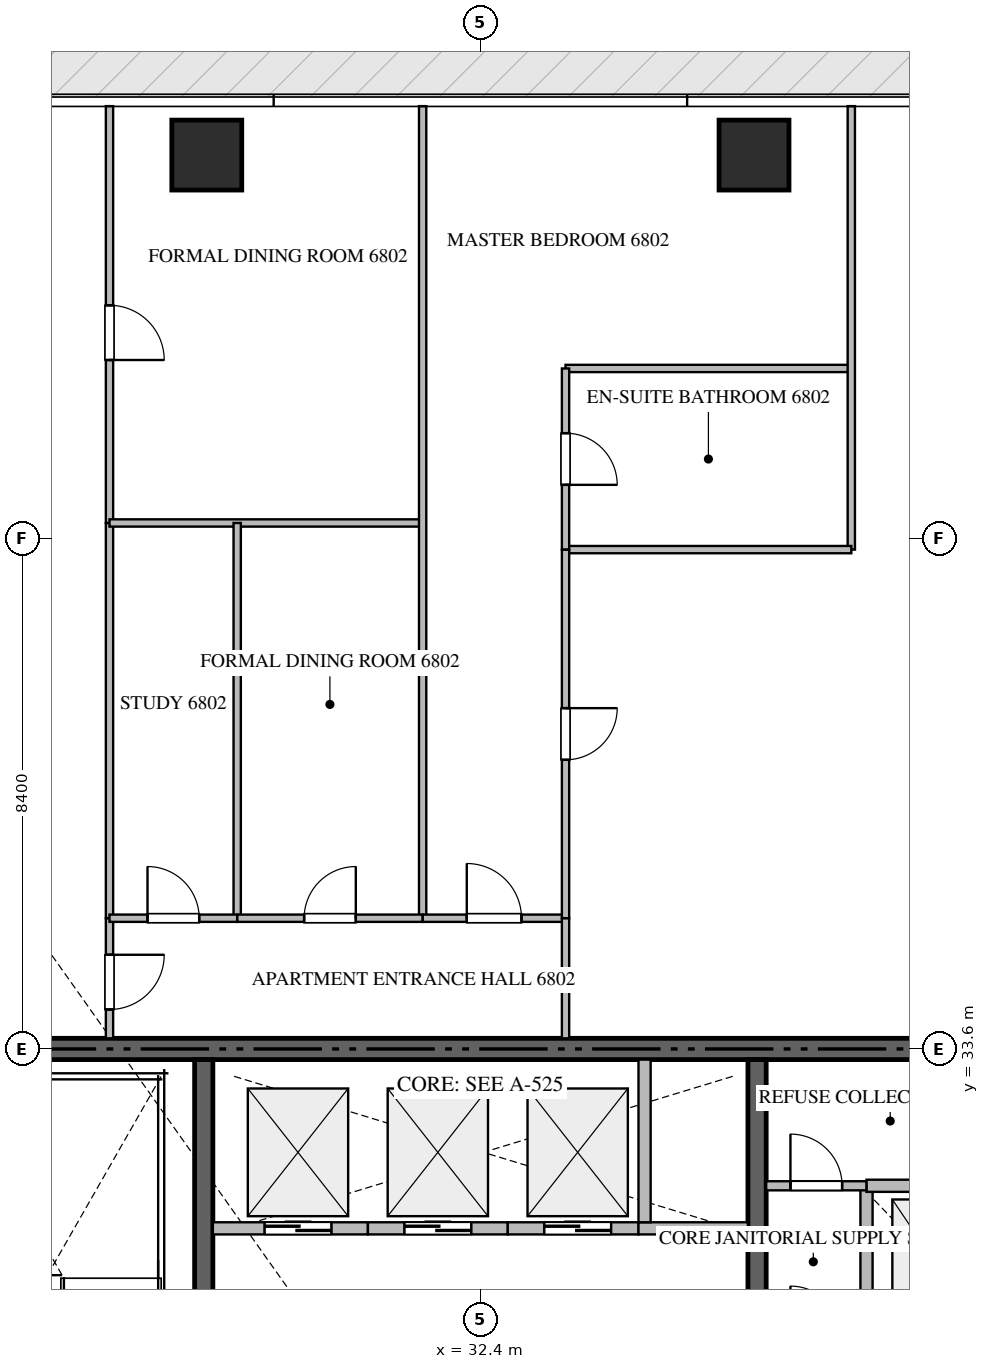
"""IFC4 building model, lengths in metres.
Left out: names, types, materials, properties, quantities, classifications, styles, units other than length and angle.
Written with IfcOpenShell. Run it as: python <this file> out.ifc"""

import sys

from ifc_helpers import new_model, si_unit, direction, frame, frame_2d, origin, origin_2d, place, context, subcontext, project, spatial, rectangle, extrude, source, transform, mapped, element, fill, save


model = new_model("IFC4")
c1 = context("Model", 3, precision=1e-05, world=origin(), true_north=direction((0.0, 1.0)))
c2 = subcontext(c1, "Body", "Model", "MODEL_VIEW")
j1 = project(units=[si_unit("LENGTHUNIT", "METRE"), si_unit("PLANEANGLEUNIT", "RADIAN")], contexts=[c1])
p1 = place(None, origin())
s1 = spatial("IfcSite", under=j1, at=p1, CompositionType="ELEMENT")
p2 = place(p1, origin())
s2 = spatial("IfcBuilding", under=s1, at=p2, CompositionType="ELEMENT")
p3 = place(p2, frame((0.0, 0.0, 272.05)))
s3 = spatial("IfcBuildingStorey", under=s2, at=p3, CompositionType="ELEMENT", Elevation=272.05)
p4 = place(p3, frame((41.4, 33.6, -0.26), z_axis=(0.0, 0.0, 1.0), x_axis=(-1.0, 0.0, 0.0)))
e1 = element("IfcWall", 1, at=p4, inside=s3, PredefinedType="SHEAR", context=c2, shape_type="SweptSolid", body=[
    extrude(rectangle(XDim=18.0, YDim=0.35, at=frame_2d((9.0, 0.0))), origin(), (0.0, 0.0, 1.0), 3.848),
])
p5 = place(p3, frame((27.85, 23.55, -0.26), z_axis=(0.0, 0.0, 1.0), x_axis=(0.0, 1.0, 0.0)))
e2 = element("IfcWall", 2, at=p5, inside=s3, PredefinedType="SHEAR", context=c2, shape_type="SweptSolid", body=[
    extrude(rectangle(XDim=9.875, YDim=0.3, at=frame_2d((4.938, 0.0))), origin(), (0.0, 0.0, 1.0), 3.848),
])
p6 = place(p3, frame((36.95, 27.05, -0.26), z_axis=(0.0, 0.0, 1.0), x_axis=(0.0, 1.0, 0.0)))
e3 = element("IfcWall", 3, at=p6, inside=s3, PredefinedType="SHEAR", context=c2, shape_type="SweptSolid", body=[
    extrude(rectangle(XDim=6.375, YDim=0.3, at=frame_2d((3.188, 0.0))), origin(), (0.0, 0.0, 1.0), 3.848),
])
m1 = source(origin(), c2, "Body", "SweptSolid", [
    extrude(rectangle(XDim=1.15, YDim=1.15, at=origin_2d()), origin(), (0.0, 0.0, 1.0), 3.85),
])
for number, where, z_axis, x_axis in (
    (4, (27.9, 48.3, -0.26), (0.0, 0.0, 1.0), (1.0, 0.0, 0.0)),
    (5, (36.9, 48.3, -0.26), (0.0, 0.0, 1.0), (1.0, 0.0, 0.0)),
):
    element("IfcColumn", number, at=place(p3, frame(where, z_axis=z_axis, x_axis=x_axis)), inside=s3, PredefinedType="COLUMN", context=c2, shape_type="MappedRepresentation", body=[
        mapped(m1, transform((0.0, 0.0, 0.0), scale=1.0)),
    ])
p7 = place(p3, frame((28.0, 30.65, 0.0), z_axis=(0.0, 0.0, 1.0), x_axis=(1.0, 0.0, 0.0)))
e6 = element("IfcWall", 6, at=p7, inside=s3, PredefinedType="STANDARD", context=c2, shape_type="SweptSolid", body=[
    extrude(rectangle(XDim=2.55, YDim=0.2, at=frame_2d((1.275, 0.0))), origin(), (0.0, 0.0, 1.0), 3.59),
])
p8 = place(p7, frame((0.85, 0.0, 0.0)))
e7 = element("IfcOpeningElement", 7, at=p8, cuts=e6, PredefinedType="OPENING", context=c2, shape_type="SweptSolid", body=[
    extrude(rectangle(XDim=1.1, YDim=2.2, at=frame_2d((0.55, 1.1))), frame((0.0, 0.11, 0.0), z_axis=(0.0, -1.0, 0.0), x_axis=(1.0, 0.0, 0.0)), (0.0, 0.0, 1.0), 0.22),
])
p9 = place(p3, frame((30.55, 30.65, 0.0), z_axis=(0.0, 0.0, 1.0), x_axis=(1.0, 0.0, 0.0)))
e8 = element("IfcWall", 8, at=p9, inside=s3, PredefinedType="STANDARD", context=c2, shape_type="SweptSolid", body=[
    extrude(rectangle(XDim=2.3, YDim=0.2, at=frame_2d((1.15, 0.0))), origin(), (0.0, 0.0, 1.0), 3.59),
])
p10 = place(p9, frame((0.6, 0.0, 0.0)))
e9 = element("IfcOpeningElement", 9, at=p10, cuts=e8, PredefinedType="OPENING", context=c2, shape_type="SweptSolid", body=[
    extrude(rectangle(XDim=1.1, YDim=2.2, at=frame_2d((0.55, 1.1))), frame((0.0, 0.11, 0.0), z_axis=(0.0, -1.0, 0.0), x_axis=(1.0, 0.0, 0.0)), (0.0, 0.0, 1.0), 0.22),
])
p11 = place(p3, frame((32.85, 30.65, 0.0), z_axis=(0.0, 0.0, 1.0), x_axis=(1.0, 0.0, 0.0)))
e10 = element("IfcWall", 10, at=p11, inside=s3, PredefinedType="STANDARD", context=c2, shape_type="SweptSolid", body=[
    extrude(rectangle(XDim=2.15, YDim=0.2, at=frame_2d((1.075, 0.0))), origin(), (0.0, 0.0, 1.0), 3.59),
])
p12 = place(p11, frame((0.6, 0.0, 0.0)))
e11 = element("IfcOpeningElement", 11, at=p12, cuts=e10, PredefinedType="OPENING", context=c2, shape_type="SweptSolid", body=[
    extrude(rectangle(XDim=1.1, YDim=2.2, at=frame_2d((0.55, 1.1))), frame((0.0, 0.11, 0.0), z_axis=(0.0, -1.0, 0.0), x_axis=(1.0, 0.0, 0.0)), (0.0, 0.0, 1.0), 0.22),
])
p13 = place(p3, frame((35.0, 30.65, 0.0), z_axis=(0.0, 0.0, 1.0), x_axis=(1.0, 0.0, 0.0)))
e12 = element("IfcWall", 12, at=p13, inside=s3, PredefinedType="STANDARD", context=c2, shape_type="SweptSolid", body=[
    extrude(rectangle(XDim=1.8, YDim=0.2, at=frame_2d((0.9, 0.0))), origin(), (0.0, 0.0, 1.0), 3.59),
])
p14 = place(p3, frame((35.1, 30.75, 0.0), z_axis=(0.0, 0.0, 1.0), x_axis=(0.0, 1.0, 0.0)))
e13 = element("IfcWall", 13, at=p14, inside=s3, PredefinedType="STANDARD", context=c2, shape_type="SweptSolid", body=[
    extrude(rectangle(XDim=2.675, YDim=0.2, at=frame_2d((1.337, 0.0))), origin(), (0.0, 0.0, 1.0), 3.59),
])
p15 = place(p3, frame((38.75, 28.85, 0.0), z_axis=(0.0, 0.0, 1.0), x_axis=(0.0, 1.0, 0.0)))
e14 = element("IfcWall", 14, at=p15, inside=s3, PredefinedType="STANDARD", context=c2, shape_type="SweptSolid", body=[
    extrude(rectangle(XDim=2.5, YDim=0.2, at=frame_2d((1.25, 0.0))), origin(), (0.0, 0.0, 1.0), 3.59),
])
p16 = place(p3, frame((38.75, 31.35, 0.0), z_axis=(0.0, 0.0, 1.0), x_axis=(1.0, 0.0, 0.0)))
e15 = element("IfcWall", 15, at=p16, inside=s3, PredefinedType="STANDARD", context=c2, shape_type="SweptSolid", body=[
    extrude(rectangle(XDim=2.475, YDim=0.2, at=frame_2d((1.238, 0.0))), origin(), (0.0, 0.0, 1.0), 3.59),
])
p17 = place(p3, frame((37.1, 31.35, 0.0), z_axis=(0.0, 0.0, 1.0), x_axis=(1.0, 0.0, 0.0)))
e16 = element("IfcWall", 16, at=p17, inside=s3, PredefinedType="PARTITIONING", context=c2, shape_type="SweptSolid", body=[
    extrude(rectangle(XDim=1.648, YDim=0.15, at=frame_2d((0.824, 0.0))), origin(), (0.0, 0.0, 1.0), 3.59),
])
p18 = place(p17, frame((0.399, 0.0, 0.0)))
e17 = element("IfcOpeningElement", 17, at=p18, cuts=e16, PredefinedType="OPENING", context=c2, shape_type="SweptSolid", body=[
    extrude(rectangle(XDim=0.85, YDim=2.1, at=frame_2d((0.425, 1.05))), frame((0.0, 0.085, 0.0), z_axis=(0.0, -1.0, 0.0), x_axis=(1.0, 0.0, 0.0)), (0.0, 0.0, 1.0), 0.17),
])
p19 = place(p3, frame((26.3, 35.75, 0.0), z_axis=(0.0, 0.0, 1.0), x_axis=(0.0, -1.0, 0.0)))
e18 = element("IfcWall", 18, at=p19, inside=s3, PredefinedType="PARTITIONING", context=c2, shape_type="SweptSolid", body=[
    extrude(rectangle(XDim=1.975, YDim=0.12, at=frame_2d((0.988, 0.0))), origin(), (0.0, 0.0, 1.0), 3.59),
])
p20 = place(p19, frame((0.601, 0.0, 0.0)))
e19 = element("IfcOpeningElement", 19, at=p20, cuts=e18, PredefinedType="OPENING", context=c2, shape_type="SweptSolid", body=[
    extrude(rectangle(XDim=0.9, YDim=2.1, at=frame_2d((0.45, 1.05))), frame((0.0, 0.07, 0.0), z_axis=(0.0, -1.0, 0.0), x_axis=(1.0, 0.0, 0.0)), (0.0, 0.0, 1.0), 0.14),
])
p21 = place(p3, frame((26.3, 49.105, 0.0), z_axis=(0.0, 0.0, 1.0), x_axis=(0.0, -1.0, 0.0)))
e20 = element("IfcWall", 20, at=p21, inside=s3, PredefinedType="PARTITIONING", context=c2, shape_type="SweptSolid", body=[
    extrude(rectangle(XDim=6.855, YDim=0.12, at=frame_2d((3.427, 0.0))), origin(), (0.0, 0.0, 1.0), 3.59),
])
p22 = place(p21, frame((3.275, 0.0, 0.0)))
e21 = element("IfcOpeningElement", 21, at=p22, cuts=e20, PredefinedType="OPENING", context=c2, shape_type="SweptSolid", body=[
    extrude(rectangle(XDim=0.9, YDim=2.1, at=frame_2d((0.45, 1.05))), frame((0.0, 0.07, 0.0), z_axis=(0.0, -1.0, 0.0), x_axis=(1.0, 0.0, 0.0)), (0.0, 0.0, 1.0), 0.14),
])
p23 = place(p3, frame((26.3, 42.248, 0.0), z_axis=(0.0, 0.0, 1.0), x_axis=(0.0, -1.0, 0.0)))
e22 = element("IfcWall", 22, at=p23, inside=s3, PredefinedType="PARTITIONING", context=c2, shape_type="SweptSolid", body=[
    extrude(rectangle(XDim=6.496, YDim=0.12, at=frame_2d((3.248, 0.0))), origin(), (0.0, 0.0, 1.0), 3.59),
])
p24 = place(p3, frame((26.3, 42.25, 0.0), z_axis=(0.0, 0.0, 1.0), x_axis=(1.0, 0.0, 0.0)))
e23 = element("IfcWall", 23, at=p24, inside=s3, PredefinedType="PARTITIONING", context=c2, shape_type="SweptSolid", body=[
    extrude(rectangle(XDim=5.15, YDim=0.12, at=frame_2d((2.575, 0.0))), origin(), (0.0, 0.0, 1.0), 3.59),
])
p25 = place(p3, frame((31.45, 49.105, 0.0), z_axis=(0.0, 0.0, 1.0), x_axis=(0.0, -1.0, 0.0)))
e24 = element("IfcWall", 24, at=p25, inside=s3, PredefinedType="PARTITIONING", context=c2, shape_type="SweptSolid", body=[
    extrude(rectangle(XDim=13.355, YDim=0.12, at=frame_2d((6.677, 0.0))), origin(), (0.0, 0.0, 1.0), 3.59),
])
p26 = place(p3, frame((28.4, 42.25, 0.0), z_axis=(0.0, 0.0, 1.0), x_axis=(0.0, -1.0, 0.0)))
e25 = element("IfcWall", 25, at=p26, inside=s3, PredefinedType="PARTITIONING", context=c2, shape_type="SweptSolid", body=[
    extrude(rectangle(XDim=6.5, YDim=0.12, at=frame_2d((3.25, 0.0))), origin(), (0.0, 0.0, 1.0), 3.59),
])
p27 = place(p3, frame((26.3, 35.75, 0.0), z_axis=(0.0, 0.0, 1.0), x_axis=(1.0, 0.0, 0.0)))
e26 = element("IfcWall", 26, at=p27, inside=s3, PredefinedType="PARTITIONING", context=c2, shape_type="SweptSolid", body=[
    extrude(rectangle(XDim=2.1, YDim=0.12, at=frame_2d((1.05, 0.0))), origin(), (0.0, 0.0, 1.0), 3.59),
])
p28 = place(p27, frame((0.625, 0.0, 0.0)))
e27 = element("IfcOpeningElement", 27, at=p28, cuts=e26, PredefinedType="OPENING", context=c2, shape_type="SweptSolid", body=[
    extrude(rectangle(XDim=0.85, YDim=2.1, at=frame_2d((0.425, 1.05))), frame((0.0, 0.07, 0.0), z_axis=(0.0, -1.0, 0.0), x_axis=(1.0, 0.0, 0.0)), (0.0, 0.0, 1.0), 0.14),
])
p29 = place(p3, frame((28.402, 35.75, 0.0), z_axis=(0.0, 0.0, 1.0), x_axis=(1.0, 0.0, 0.0)))
e28 = element("IfcWall", 28, at=p29, inside=s3, PredefinedType="PARTITIONING", context=c2, shape_type="SweptSolid", body=[
    extrude(rectangle(XDim=3.048, YDim=0.12, at=frame_2d((1.524, 0.0))), origin(), (0.0, 0.0, 1.0), 3.59),
])
p30 = place(p29, frame((1.099, 0.0, 0.0)))
e29 = element("IfcOpeningElement", 29, at=p30, cuts=e28, PredefinedType="OPENING", context=c2, shape_type="SweptSolid", body=[
    extrude(rectangle(XDim=0.85, YDim=2.1, at=frame_2d((0.425, 1.05))), frame((0.0, 0.07, 0.0), z_axis=(0.0, -1.0, 0.0), x_axis=(1.0, 0.0, 0.0)), (0.0, 0.0, 1.0), 0.14),
])
p31 = place(p3, frame((31.452, 35.75, 0.0), z_axis=(0.0, 0.0, 1.0), x_axis=(1.0, 0.0, 0.0)))
e30 = element("IfcWall", 30, at=p31, inside=s3, PredefinedType="PARTITIONING", context=c2, shape_type="SweptSolid", body=[
    extrude(rectangle(XDim=2.348, YDim=0.12, at=frame_2d((1.174, 0.0))), origin(), (0.0, 0.0, 1.0), 3.59),
])
p32 = place(p31, frame((0.724, 0.0, 0.0)))
e31 = element("IfcOpeningElement", 31, at=p32, cuts=e30, PredefinedType="OPENING", context=c2, shape_type="SweptSolid", body=[
    extrude(rectangle(XDim=0.9, YDim=2.1, at=frame_2d((0.45, 1.05))), frame((0.0, 0.07, 0.0), z_axis=(0.0, -1.0, 0.0), x_axis=(1.0, 0.0, 0.0)), (0.0, 0.0, 1.0), 0.14),
])
p33 = place(p3, frame((33.8, 44.791, 0.0), z_axis=(0.0, 0.0, 1.0), x_axis=(1.0, 0.0, 0.0)))
e32 = element("IfcWall", 32, at=p33, inside=s3, PredefinedType="PARTITIONING", context=c2, shape_type="SweptSolid", body=[
    extrude(rectangle(XDim=4.7, YDim=0.12, at=frame_2d((2.35, 0.0))), origin(), (0.0, 0.0, 1.0), 3.59),
])
p34 = place(p3, frame((38.5, 49.105, 0.0), z_axis=(0.0, 0.0, 1.0), x_axis=(0.0, -1.0, 0.0)))
e33 = element("IfcWall", 33, at=p34, inside=s3, PredefinedType="PARTITIONING", context=c2, shape_type="SweptSolid", body=[
    extrude(rectangle(XDim=7.293, YDim=0.12, at=frame_2d((3.646, 0.0))), origin(), (0.0, 0.0, 1.0), 3.59),
])
p35 = place(p3, frame((33.8, 41.812, 0.0), z_axis=(0.0, 0.0, 1.0), x_axis=(1.0, 0.0, 0.0)))
e34 = element("IfcWall", 34, at=p35, inside=s3, PredefinedType="PARTITIONING", context=c2, shape_type="SweptSolid", body=[
    extrude(rectangle(XDim=4.7, YDim=0.12, at=frame_2d((2.35, 0.0))), origin(), (0.0, 0.0, 1.0), 3.59),
])
p36 = place(p3, frame((33.8, 44.791, 0.0), z_axis=(0.0, 0.0, 1.0), x_axis=(0.0, -1.0, 0.0)))
e35 = element("IfcWall", 35, at=p36, inside=s3, PredefinedType="PARTITIONING", context=c2, shape_type="SweptSolid", body=[
    extrude(rectangle(XDim=2.979, YDim=0.12, at=frame_2d((1.49, 0.0))), origin(), (0.0, 0.0, 1.0), 3.59),
])
p37 = place(p36, frame((1.064, 0.0, 0.0)))
e36 = element("IfcOpeningElement", 36, at=p37, cuts=e35, PredefinedType="OPENING", context=c2, shape_type="SweptSolid", body=[
    extrude(rectangle(XDim=0.85, YDim=2.1, at=frame_2d((0.425, 1.05))), frame((0.0, 0.07, 0.0), z_axis=(0.0, -1.0, 0.0), x_axis=(1.0, 0.0, 0.0)), (0.0, 0.0, 1.0), 0.14),
])
p38 = place(p3, frame((33.8, 41.81, 0.0), z_axis=(0.0, 0.0, 1.0), x_axis=(0.0, -1.0, 0.0)))
e37 = element("IfcWall", 37, at=p38, inside=s3, PredefinedType="PARTITIONING", context=c2, shape_type="SweptSolid", body=[
    extrude(rectangle(XDim=6.06, YDim=0.12, at=frame_2d((3.03, 0.0))), origin(), (0.0, 0.0, 1.0), 3.59),
])
p39 = place(p38, frame((2.605, 0.0, 0.0)))
e38 = element("IfcOpeningElement", 38, at=p39, cuts=e37, PredefinedType="OPENING", context=c2, shape_type="SweptSolid", body=[
    extrude(rectangle(XDim=0.85, YDim=2.1, at=frame_2d((0.425, 1.05))), frame((0.0, 0.07, 0.0), z_axis=(0.0, -1.0, 0.0), x_axis=(1.0, 0.0, 0.0)), (0.0, 0.0, 1.0), 0.14),
])
p40 = place(p3, frame((33.8, 35.748, 0.0), z_axis=(0.0, 0.0, 1.0), x_axis=(0.0, -1.0, 0.0)))
e39 = element("IfcWall", 39, at=p40, inside=s3, PredefinedType="PARTITIONING", context=c2, shape_type="SweptSolid", body=[
    extrude(rectangle(XDim=1.973, YDim=0.12, at=frame_2d((0.987, 0.0))), origin(), (0.0, 0.0, 1.0), 3.59),
])
m2 = source(origin(), c2, "Body", "SweptSolid", [
    extrude(rectangle(XDim=1.1, YDim=2.2, at=frame_2d((0.55, 1.1))), frame((0.0, 0.025, 0.0), z_axis=(0.0, -1.0, 0.0), x_axis=(1.0, 0.0, 0.0)), (0.0, 0.0, 1.0), 0.05),
])
p41 = place(p8, origin())
e40 = element("IfcDoor", 40, at=p41, inside=s3, OperationType="DOUBLE_DOOR_SLIDING", PredefinedType="DOOR", context=c2, shape_type="MappedRepresentation", body=[
    mapped(m2, transform((0.0, 0.0, 0.0), scale=1.0)),
])
fill(e7, e40)
p42 = place(p10, origin())
e41 = element("IfcDoor", 41, at=p42, inside=s3, OperationType="DOUBLE_DOOR_SLIDING", PredefinedType="DOOR", context=c2, shape_type="MappedRepresentation", body=[
    mapped(m2, transform((0.0, 0.0, 0.0), scale=1.0)),
])
fill(e9, e41)
p43 = place(p12, origin())
e42 = element("IfcDoor", 42, at=p43, inside=s3, OperationType="DOUBLE_DOOR_SLIDING", PredefinedType="DOOR", context=c2, shape_type="MappedRepresentation", body=[
    mapped(m2, transform((0.0, 0.0, 0.0), scale=1.0)),
])
fill(e11, e42)
m3 = source(origin(), c2, "Body", "SweptSolid", [
    extrude(rectangle(XDim=0.85, YDim=2.1, at=frame_2d((0.425, 1.05))), frame((0.0, 0.025, 0.0), z_axis=(0.0, -1.0, 0.0), x_axis=(1.0, 0.0, 0.0)), (0.0, 0.0, 1.0), 0.05),
])
p44 = place(p18, origin())
e43 = element("IfcDoor", 43, at=p44, inside=s3, OperationType="SINGLE_SWING_LEFT", PredefinedType="DOOR", context=c2, shape_type="MappedRepresentation", body=[
    mapped(m3, transform((0.0, 0.0, 0.0), scale=1.0)),
])
fill(e17, e43)
m4 = source(origin(), c2, "Body", "SweptSolid", [
    extrude(rectangle(XDim=0.9, YDim=2.1, at=frame_2d((0.45, 1.05))), frame((0.0, 0.025, 0.0), z_axis=(0.0, -1.0, 0.0), x_axis=(1.0, 0.0, 0.0)), (0.0, 0.0, 1.0), 0.05),
])
p45 = place(p20, origin())
e44 = element("IfcDoor", 44, at=p45, inside=s3, OperationType="SINGLE_SWING_LEFT", PredefinedType="DOOR", context=c2, shape_type="MappedRepresentation", body=[
    mapped(m4, transform((0.0, 0.0, 0.0), scale=1.0)),
])
fill(e19, e44)
p46 = place(p22, origin())
e45 = element("IfcDoor", 45, at=p46, inside=s3, OperationType="SINGLE_SWING_RIGHT", PredefinedType="DOOR", context=c2, shape_type="MappedRepresentation", body=[
    mapped(m4, transform((0.0, 0.0, 0.0), scale=1.0)),
])
fill(e21, e45)
p47 = place(p28, origin())
e46 = element("IfcDoor", 46, at=p47, inside=s3, OperationType="SINGLE_SWING_LEFT", PredefinedType="DOOR", context=c2, shape_type="MappedRepresentation", body=[
    mapped(m3, transform((0.0, 0.0, 0.0), scale=1.0)),
])
fill(e27, e46)
p48 = place(p30, origin())
e47 = element("IfcDoor", 47, at=p48, inside=s3, OperationType="SINGLE_SWING_RIGHT", PredefinedType="DOOR", context=c2, shape_type="MappedRepresentation", body=[
    mapped(m3, transform((0.0, 0.0, 0.0), scale=1.0)),
])
fill(e29, e47)
p49 = place(p32, origin())
e48 = element("IfcDoor", 48, at=p49, inside=s3, OperationType="SINGLE_SWING_LEFT", PredefinedType="DOOR", context=c2, shape_type="MappedRepresentation", body=[
    mapped(m4, transform((0.0, 0.0, 0.0), scale=1.0)),
])
fill(e31, e48)
p50 = place(p37, origin())
e49 = element("IfcDoor", 49, at=p50, inside=s3, OperationType="SINGLE_SWING_RIGHT", PredefinedType="DOOR", context=c2, shape_type="MappedRepresentation", body=[
    mapped(m3, transform((0.0, 0.0, 0.0), scale=1.0)),
])
fill(e36, e49)
p51 = place(p39, origin())
e50 = element("IfcDoor", 50, at=p51, inside=s3, OperationType="SINGLE_SWING_LEFT", PredefinedType="DOOR", context=c2, shape_type="MappedRepresentation", body=[
    mapped(m3, transform((0.0, 0.0, 0.0), scale=1.0)),
])
fill(e38, e50)
save(model, sys.argv[1])
